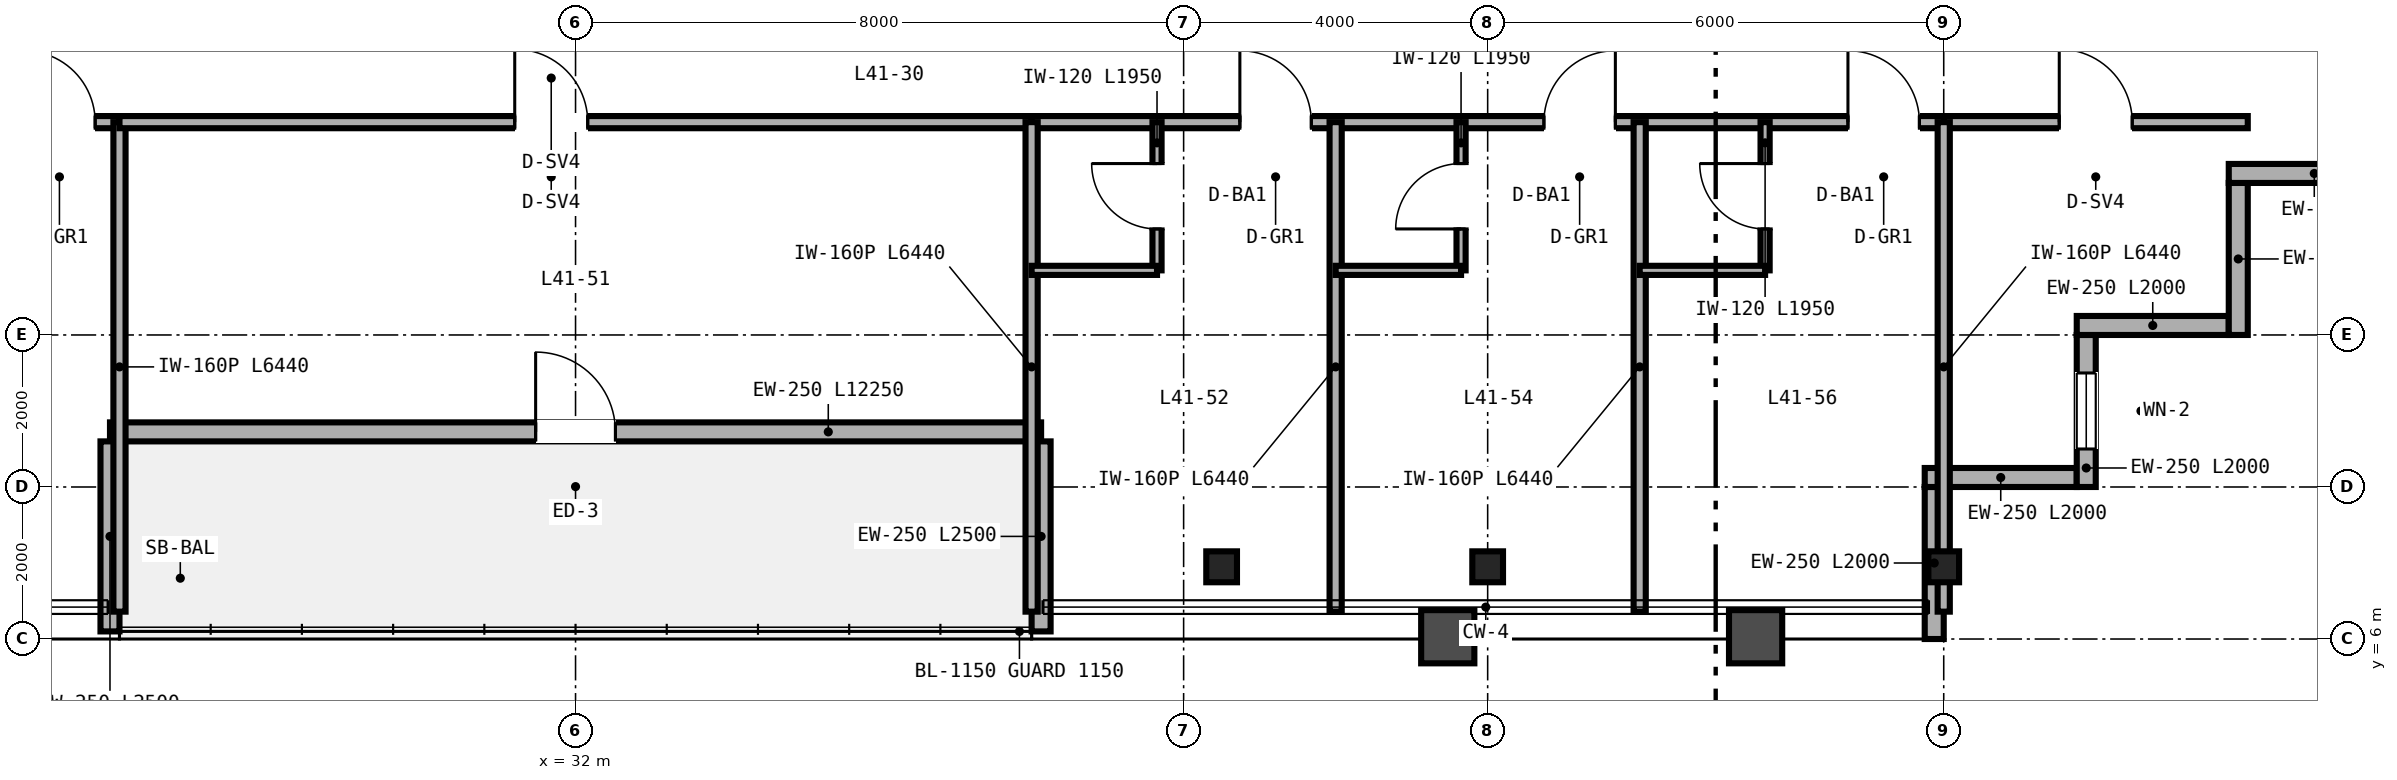
"""IFC4 building model, lengths in metres.
Left out: names, types, materials, properties, quantities, classifications, styles, units other than length and angle.
Written with IfcOpenShell. Run it as: python <this file> out.ifc"""

import sys

from ifc_helpers import new_model, si_unit, direction, frame, frame_2d, origin, origin_2d, place, context, subcontext, project, spatial, rectangle, i_section, extrude, source, transform, mapped, element, fill, save


model = new_model("IFC4")
c1 = context("Model", 3, precision=1e-05, world=origin(), true_north=direction((0.0, 1.0)))
c2 = subcontext(c1, "Body", "Model", "MODEL_VIEW")
j1 = project(units=[si_unit("LENGTHUNIT", "METRE"), si_unit("PLANEANGLEUNIT", "RADIAN")], contexts=[c1])
p1 = place(None, origin())
s1 = spatial("IfcSite", under=j1, at=p1, CompositionType="ELEMENT")
p2 = place(p1, origin())
s2 = spatial("IfcBuilding", under=s1, at=p2, CompositionType="ELEMENT")
p3 = place(p2, frame((0.0, 0.0, 166.8)))
s3 = spatial("IfcBuildingStorey", under=s2, at=p3, CompositionType="ELEMENT", Elevation=166.8)
m1 = source(origin(), c2, "Body", "SweptSolid", [
    extrude(i_section(OverallWidth=0.404, OverallDepth=0.407, WebThickness=0.027, FlangeThickness=0.044, FilletRadius=0.025, at=origin_2d()), origin(), (0.0, 0.0, 1.0), 3.37),
])
for number, where, z_axis, x_axis in (
    (1, (40.5, 6.95, 0.0), (0.0, 0.0, 1.0), (1.0, 0.0, 0.0)),
    (2, (44.0, 6.95, 0.0), (0.0, 0.0, 1.0), (1.0, 0.0, 0.0)),
    (3, (50.0, 6.95, 0.0), (0.0, 0.0, 1.0), (1.0, 0.0, 0.0)),
):
    element("IfcColumn", number, at=place(p3, frame(where, z_axis=z_axis, x_axis=x_axis)), inside=s3, PredefinedType="COLUMN", context=c2, shape_type="MappedRepresentation", body=[
        mapped(m1, transform((0.0, 0.0, 0.0), scale=1.0)),
    ])
p4 = place(p3, frame((49.875, 6.0, 0.0), z_axis=(0.0, 0.0, 1.0), x_axis=(0.0, 1.0, 0.0)))
e4 = element("IfcWall", 4, at=p4, inside=s3, PredefinedType="SOLIDWALL", context=c2, shape_type="SweptSolid", body=[
    extrude(rectangle(XDim=2.0, YDim=0.25, at=frame_2d((1.0, 0.0))), origin(), (0.0, 0.0, 1.0), 2.677),
])
p5 = place(p3, frame((49.75, 8.125, 0.0), z_axis=(0.0, 0.0, 1.0), x_axis=(1.0, 0.0, 0.0)))
e5 = element("IfcWall", 5, at=p5, inside=s3, PredefinedType="SOLIDWALL", context=c2, shape_type="SweptSolid", body=[
    extrude(rectangle(XDim=2.0, YDim=0.25, at=frame_2d((1.0, 0.0))), origin(), (0.0, 0.0, 1.0), 3.37),
])
p6 = place(p3, frame((51.875, 8.0, 0.0), z_axis=(0.0, 0.0, 1.0), x_axis=(0.0, 1.0, 0.0)))
e6 = element("IfcWall", 6, at=p6, inside=s3, PredefinedType="SOLIDWALL", context=c2, shape_type="SweptSolid", body=[
    extrude(rectangle(XDim=2.0, YDim=0.25, at=frame_2d((1.0, 0.0))), origin(), (0.0, 0.0, 1.0), 3.37),
])
p7 = place(p6, frame((0.5, 0.0, 0.85)))
e7 = element("IfcOpeningElement", 7, at=p7, cuts=e6, PredefinedType="OPENING", context=c2, shape_type="SweptSolid", body=[
    extrude(rectangle(XDim=1.0, YDim=1.9, at=frame_2d((0.5, 0.95))), frame((0.0, 0.135, 0.0), z_axis=(0.0, -1.0, 0.0), x_axis=(1.0, 0.0, 0.0)), (0.0, 0.0, 1.0), 0.27),
])
for number, where, z_axis, x_axis in (
    (8, (51.75, 10.125, 0.0), (0.0, 0.0, 1.0), (1.0, 0.0, 0.0)),
    (9, (53.875, 10.0, 0.0), (0.0, 0.0, 1.0), (0.0, 1.0, 0.0)),
):
    element("IfcWall", number, at=place(p3, frame(where, z_axis=z_axis, x_axis=x_axis)), inside=s3, PredefinedType="SOLIDWALL", context=c2, shape_type="SweptSolid", body=[
        extrude(rectangle(XDim=2.0, YDim=0.25, at=frame_2d((1.0, 0.0))), origin(), (0.0, 0.0, 1.0), 3.37),
    ])
p8 = place(p3, frame((53.75, 12.125, 0.0), z_axis=(0.0, 0.0, 1.0), x_axis=(1.0, 0.0, 0.0)))
e10 = element("IfcWall", 10, at=p8, inside=s3, PredefinedType="SOLIDWALL", context=c2, shape_type="SweptSolid", body=[
    extrude(rectangle(XDim=2.25, YDim=0.25, at=frame_2d((1.125, 0.0))), origin(), (0.0, 0.0, 1.0), 3.37),
])
p9 = place(p3, frame((25.875, 8.725, 0.0), z_axis=(0.0, 0.0, 1.0), x_axis=(1.0, 0.0, 0.0)))
e11 = element("IfcWall", 11, at=p9, inside=s3, PredefinedType="SOLIDWALL", context=c2, shape_type="SweptSolid", body=[
    extrude(rectangle(XDim=12.25, YDim=0.25, at=frame_2d((6.125, 0.0))), origin(), (0.0, 0.0, 1.0), 3.37),
])
p10 = place(p9, frame((5.6, 0.0, 0.0)))
e12 = element("IfcOpeningElement", 12, at=p10, cuts=e11, PredefinedType="OPENING", context=c2, shape_type="SweptSolid", body=[
    extrude(rectangle(XDim=1.05, YDim=2.15, at=frame_2d((0.525, 1.075))), frame((0.0, 0.135, 0.0), z_axis=(0.0, -1.0, 0.0), x_axis=(1.0, 0.0, 0.0)), (0.0, 0.0, 1.0), 0.27),
])
for number, where, z_axis, x_axis in (
    (13, (25.875, 6.1, 0.0), (0.0, 0.0, 1.0), (0.0, 1.0, 0.0)),
    (14, (38.125, 6.1, 0.0), (0.0, 0.0, 1.0), (0.0, 1.0, 0.0)),
):
    element("IfcWall", number, at=place(p3, frame(where, z_axis=z_axis, x_axis=x_axis)), inside=s3, PredefinedType="SOLIDWALL", context=c2, shape_type="SweptSolid", body=[
        extrude(rectangle(XDim=2.5, YDim=0.25, at=frame_2d((1.25, 0.0))), origin(), (0.0, 0.0, 1.0), 2.443),
    ])
p11 = place(p3, frame((50.0, 12.8, 0.0), z_axis=(0.0, 0.0, 1.0), x_axis=(1.0, 0.0, 0.0)))
e15 = element("IfcWall", 15, at=p11, inside=s3, PredefinedType="PARTITIONING", context=c2, shape_type="SweptSolid", body=[
    extrude(rectangle(XDim=4.0, YDim=0.16, at=frame_2d((2.0, 0.0))), origin(), (0.0, 0.0, 1.0), 3.37),
])
p12 = place(p11, frame((1.52, 0.0, 0.0)))
e16 = element("IfcOpeningElement", 16, at=p12, cuts=e15, PredefinedType="OPENING", context=c2, shape_type="SweptSolid", body=[
    extrude(rectangle(XDim=0.96, YDim=2.15, at=frame_2d((0.48, 1.075))), frame((0.0, 0.09, 0.0), z_axis=(0.0, -1.0, 0.0), x_axis=(1.0, 0.0, 0.0)), (0.0, 0.0, 1.0), 0.18),
])
p13 = place(p3, frame((14.0, 12.8, 0.0), z_axis=(0.0, 0.0, 1.0), x_axis=(1.0, 0.0, 0.0)))
e17 = element("IfcWall", 17, at=p13, inside=s3, PredefinedType="PARTITIONING", context=c2, shape_type="SweptSolid", body=[
    extrude(rectangle(XDim=12.0, YDim=0.16, at=frame_2d((6.0, 0.0))), origin(), (0.0, 0.0, 1.0), 2.913),
])
p14 = place(p13, frame((2.74, 0.0, 0.0)))
e18 = element("IfcOpeningElement", 18, at=p14, cuts=e17, PredefinedType="OPENING", context=c2, shape_type="SweptSolid", body=[
    extrude(rectangle(XDim=0.94, YDim=2.15, at=frame_2d((0.47, 1.075))), frame((0.0, 0.09, 0.0), z_axis=(0.0, -1.0, 0.0), x_axis=(1.0, 0.0, 0.0)), (0.0, 0.0, 1.0), 0.18),
])
p15 = place(p13, frame((6.74, 0.0, 0.0)))
e19 = element("IfcOpeningElement", 19, at=p15, cuts=e17, PredefinedType="OPENING", context=c2, shape_type="SweptSolid", body=[
    extrude(rectangle(XDim=0.94, YDim=2.15, at=frame_2d((0.47, 1.075))), frame((0.0, 0.09, 0.0), z_axis=(0.0, -1.0, 0.0), x_axis=(1.0, 0.0, 0.0)), (0.0, 0.0, 1.0), 0.18),
])
p16 = place(p13, frame((10.74, 0.0, 0.0)))
e20 = element("IfcOpeningElement", 20, at=p16, cuts=e17, PredefinedType="OPENING", context=c2, shape_type="SweptSolid", body=[
    extrude(rectangle(XDim=0.94, YDim=2.15, at=frame_2d((0.47, 1.075))), frame((0.0, 0.09, 0.0), z_axis=(0.0, -1.0, 0.0), x_axis=(1.0, 0.0, 0.0)), (0.0, 0.0, 1.0), 0.18),
])
p17 = place(p3, frame((26.0, 6.36, 0.0), z_axis=(0.0, 0.0, 1.0), x_axis=(0.0, 1.0, 0.0)))
e21 = element("IfcWall", 21, at=p17, inside=s3, PredefinedType="PARTITIONING", context=c2, shape_type="SweptSolid", body=[
    extrude(rectangle(XDim=6.44, YDim=0.16, at=frame_2d((3.22, 0.0))), origin(), (0.0, 0.0, 1.0), 2.443),
])
p18 = place(p3, frame((26.0, 12.8, 0.0), z_axis=(0.0, 0.0, 1.0), x_axis=(1.0, 0.0, 0.0)))
e22 = element("IfcWall", 22, at=p18, inside=s3, PredefinedType="PARTITIONING", context=c2, shape_type="SweptSolid", body=[
    extrude(rectangle(XDim=12.0, YDim=0.16, at=frame_2d((6.0, 0.0))), origin(), (0.0, 0.0, 1.0), 3.37),
])
p19 = place(p18, frame((5.2, 0.0, 0.0)))
e23 = element("IfcOpeningElement", 23, at=p19, cuts=e22, PredefinedType="OPENING", context=c2, shape_type="SweptSolid", body=[
    extrude(rectangle(XDim=0.96, YDim=2.15, at=frame_2d((0.48, 1.075))), frame((0.0, 0.09, 0.0), z_axis=(0.0, -1.0, 0.0), x_axis=(1.0, 0.0, 0.0)), (0.0, 0.0, 1.0), 0.18),
])
p20 = place(p3, frame((38.0, 12.8, 0.0), z_axis=(0.0, 0.0, 1.0), x_axis=(1.0, 0.0, 0.0)))
e24 = element("IfcWall", 24, at=p20, inside=s3, PredefinedType="PARTITIONING", context=c2, shape_type="SweptSolid", body=[
    extrude(rectangle(XDim=12.0, YDim=0.16, at=frame_2d((6.0, 0.0))), origin(), (0.0, 0.0, 1.0), 2.913),
])
p21 = place(p20, frame((2.74, 0.0, 0.0)))
e25 = element("IfcOpeningElement", 25, at=p21, cuts=e24, PredefinedType="OPENING", context=c2, shape_type="SweptSolid", body=[
    extrude(rectangle(XDim=0.94, YDim=2.15, at=frame_2d((0.47, 1.075))), frame((0.0, 0.09, 0.0), z_axis=(0.0, -1.0, 0.0), x_axis=(1.0, 0.0, 0.0)), (0.0, 0.0, 1.0), 0.18),
])
p22 = place(p20, frame((6.74, 0.0, 0.0)))
e26 = element("IfcOpeningElement", 26, at=p22, cuts=e24, PredefinedType="OPENING", context=c2, shape_type="SweptSolid", body=[
    extrude(rectangle(XDim=0.94, YDim=2.15, at=frame_2d((0.47, 1.075))), frame((0.0, 0.09, 0.0), z_axis=(0.0, -1.0, 0.0), x_axis=(1.0, 0.0, 0.0)), (0.0, 0.0, 1.0), 0.18),
])
p23 = place(p20, frame((10.74, 0.0, 0.0)))
e27 = element("IfcOpeningElement", 27, at=p23, cuts=e24, PredefinedType="OPENING", context=c2, shape_type="SweptSolid", body=[
    extrude(rectangle(XDim=0.94, YDim=2.15, at=frame_2d((0.47, 1.075))), frame((0.0, 0.09, 0.0), z_axis=(0.0, -1.0, 0.0), x_axis=(1.0, 0.0, 0.0)), (0.0, 0.0, 1.0), 0.18),
])
p24 = place(p3, frame((38.0, 6.36, 0.0), z_axis=(0.0, 0.0, 1.0), x_axis=(0.0, 1.0, 0.0)))
e28 = element("IfcWall", 28, at=p24, inside=s3, PredefinedType="PARTITIONING", context=c2, shape_type="SweptSolid", body=[
    extrude(rectangle(XDim=6.44, YDim=0.16, at=frame_2d((3.22, 0.0))), origin(), (0.0, 0.0, 1.0), 2.443),
])
p25 = place(p3, frame((50.0, 6.36, 0.0), z_axis=(0.0, 0.0, 1.0), x_axis=(0.0, 1.0, 0.0)))
e29 = element("IfcWall", 29, at=p25, inside=s3, PredefinedType="PARTITIONING", context=c2, shape_type="SweptSolid", body=[
    extrude(rectangle(XDim=6.44, YDim=0.16, at=frame_2d((3.22, 0.0))), origin(), (0.0, 0.0, 1.0), 2.677),
])
p26 = place(p3, frame((42.0, 6.36, 0.0), z_axis=(0.0, 0.0, 1.0), x_axis=(0.0, 1.0, 0.0)))
e30 = element("IfcWall", 30, at=p26, inside=s3, PredefinedType="PARTITIONING", context=c2, shape_type="SweptSolid", body=[
    extrude(rectangle(XDim=6.44, YDim=0.16, at=frame_2d((3.22, 0.0))), origin(), (0.0, 0.0, 1.0), 2.833),
])
p27 = place(p3, frame((39.65, 10.85, 0.0), z_axis=(0.0, 0.0, 1.0), x_axis=(0.0, 1.0, 0.0)))
e31 = element("IfcWall", 31, at=p27, inside=s3, PredefinedType="PARTITIONING", context=c2, shape_type="SweptSolid", body=[
    extrude(rectangle(XDim=1.95, YDim=0.12, at=frame_2d((0.975, 0.0))), origin(), (0.0, 0.0, 1.0), 3.37),
])
p28 = place(p27, frame((0.545, 0.0, 0.0)))
e32 = element("IfcOpeningElement", 32, at=p28, cuts=e31, PredefinedType="OPENING", context=c2, shape_type="SweptSolid", body=[
    extrude(rectangle(XDim=0.86, YDim=2.1, at=frame_2d((0.43, 1.05))), frame((0.0, 0.07, 0.0), z_axis=(0.0, -1.0, 0.0), x_axis=(1.0, 0.0, 0.0)), (0.0, 0.0, 1.0), 0.14),
])
p29 = place(p3, frame((38.0, 10.85, 0.0), z_axis=(0.0, 0.0, 1.0), x_axis=(1.0, 0.0, 0.0)))
e33 = element("IfcWall", 33, at=p29, inside=s3, PredefinedType="PARTITIONING", context=c2, shape_type="SweptSolid", body=[
    extrude(rectangle(XDim=1.65, YDim=0.12, at=frame_2d((0.825, 0.0))), origin(), (0.0, 0.0, 1.0), 3.37),
])
p30 = place(p3, frame((46.0, 6.36, 0.0), z_axis=(0.0, 0.0, 1.0), x_axis=(0.0, 1.0, 0.0)))
e34 = element("IfcWall", 34, at=p30, inside=s3, PredefinedType="PARTITIONING", context=c2, shape_type="SweptSolid", body=[
    extrude(rectangle(XDim=6.44, YDim=0.16, at=frame_2d((3.22, 0.0))), origin(), (0.0, 0.0, 1.0), 2.677),
])
p31 = place(p3, frame((43.65, 10.85, 0.0), z_axis=(0.0, 0.0, 1.0), x_axis=(0.0, 1.0, 0.0)))
e35 = element("IfcWall", 35, at=p31, inside=s3, PredefinedType="PARTITIONING", context=c2, shape_type="SweptSolid", body=[
    extrude(rectangle(XDim=1.95, YDim=0.12, at=frame_2d((0.975, 0.0))), origin(), (0.0, 0.0, 1.0), 3.37),
])
p32 = place(p31, frame((0.545, 0.0, 0.0)))
e36 = element("IfcOpeningElement", 36, at=p32, cuts=e35, PredefinedType="OPENING", context=c2, shape_type="SweptSolid", body=[
    extrude(rectangle(XDim=0.86, YDim=2.1, at=frame_2d((0.43, 1.05))), frame((0.0, 0.07, 0.0), z_axis=(0.0, -1.0, 0.0), x_axis=(1.0, 0.0, 0.0)), (0.0, 0.0, 1.0), 0.14),
])
p33 = place(p3, frame((42.0, 10.85, 0.0), z_axis=(0.0, 0.0, 1.0), x_axis=(1.0, 0.0, 0.0)))
e37 = element("IfcWall", 37, at=p33, inside=s3, PredefinedType="PARTITIONING", context=c2, shape_type="SweptSolid", body=[
    extrude(rectangle(XDim=1.65, YDim=0.12, at=frame_2d((0.825, 0.0))), origin(), (0.0, 0.0, 1.0), 3.37),
])
p34 = place(p3, frame((47.65, 10.85, 0.0), z_axis=(0.0, 0.0, 1.0), x_axis=(0.0, 1.0, 0.0)))
e38 = element("IfcWall", 38, at=p34, inside=s3, PredefinedType="PARTITIONING", context=c2, shape_type="SweptSolid", body=[
    extrude(rectangle(XDim=1.95, YDim=0.12, at=frame_2d((0.975, 0.0))), origin(), (0.0, 0.0, 1.0), 3.37),
])
p35 = place(p34, frame((0.545, 0.0, 0.0)))
e39 = element("IfcOpeningElement", 39, at=p35, cuts=e38, PredefinedType="OPENING", context=c2, shape_type="SweptSolid", body=[
    extrude(rectangle(XDim=0.86, YDim=2.1, at=frame_2d((0.43, 1.05))), frame((0.0, 0.07, 0.0), z_axis=(0.0, -1.0, 0.0), x_axis=(1.0, 0.0, 0.0)), (0.0, 0.0, 1.0), 0.14),
])
p36 = place(p3, frame((46.0, 10.85, 0.0), z_axis=(0.0, 0.0, 1.0), x_axis=(1.0, 0.0, 0.0)))
e40 = element("IfcWall", 40, at=p36, inside=s3, PredefinedType="PARTITIONING", context=c2, shape_type="SweptSolid", body=[
    extrude(rectangle(XDim=1.65, YDim=0.12, at=frame_2d((0.825, 0.0))), origin(), (0.0, 0.0, 1.0), 3.37),
])
m2 = source(origin(), c2, "Body", "SweptSolid", [
    extrude(rectangle(XDim=1.0, YDim=1.9, at=frame_2d((0.5, 0.95))), frame((0.0, 0.03, 0.0), z_axis=(0.0, -1.0, 0.0), x_axis=(1.0, 0.0, 0.0)), (0.0, 0.0, 1.0), 0.06),
])
p37 = place(p7, origin())
e41 = element("IfcWindow", 41, at=p37, inside=s3, PartitioningType="SINGLE_PANEL", PredefinedType="WINDOW", context=c2, shape_type="MappedRepresentation", body=[
    mapped(m2, transform((0.0, 0.0, 0.0), scale=1.0)),
])
fill(e7, e41)
m3 = source(origin(), c2, "Body", "SweptSolid", [
    extrude(rectangle(XDim=1.05, YDim=2.15, at=frame_2d((0.525, 1.075))), frame((0.0, 0.025, 0.0), z_axis=(0.0, -1.0, 0.0), x_axis=(1.0, 0.0, 0.0)), (0.0, 0.0, 1.0), 0.05),
])
p38 = place(p10, origin())
e42 = element("IfcDoor", 42, at=p38, inside=s3, OperationType="SINGLE_SWING_LEFT", PredefinedType="DOOR", context=c2, shape_type="MappedRepresentation", body=[
    mapped(m3, transform((0.0, 0.0, 0.0), scale=1.0)),
])
fill(e12, e42)
m4 = source(origin(), c2, "Body", "SweptSolid", [
    extrude(rectangle(XDim=0.96, YDim=2.15, at=frame_2d((0.48, 1.075))), frame((0.0, 0.025, 0.0), z_axis=(0.0, -1.0, 0.0), x_axis=(1.0, 0.0, 0.0)), (0.0, 0.0, 1.0), 0.05),
])
p39 = place(p12, origin())
e43 = element("IfcDoor", 43, at=p39, inside=s3, OperationType="SINGLE_SWING_LEFT", PredefinedType="DOOR", context=c2, shape_type="MappedRepresentation", body=[
    mapped(m4, transform((0.0, 0.0, 0.0), scale=1.0)),
])
fill(e16, e43)
m5 = source(origin(), c2, "Body", "SweptSolid", [
    extrude(rectangle(XDim=0.94, YDim=2.15, at=frame_2d((0.47, 1.075))), frame((0.0, 0.025, 0.0), z_axis=(0.0, -1.0, 0.0), x_axis=(1.0, 0.0, 0.0)), (0.0, 0.0, 1.0), 0.05),
])
p40 = place(p16, origin())
e44 = element("IfcDoor", 44, at=p40, inside=s3, OperationType="SINGLE_SWING_LEFT", PredefinedType="DOOR", context=c2, shape_type="MappedRepresentation", body=[
    mapped(m5, transform((0.0, 0.0, 0.0), scale=1.0)),
])
fill(e20, e44)
p41 = place(p19, origin())
e45 = element("IfcDoor", 45, at=p41, inside=s3, OperationType="SINGLE_SWING_LEFT", PredefinedType="DOOR", context=c2, shape_type="MappedRepresentation", body=[
    mapped(m4, transform((0.0, 0.0, 0.0), scale=1.0)),
])
fill(e23, e45)
m6 = source(origin(), c2, "Body", "SweptSolid", [
    extrude(rectangle(XDim=0.86, YDim=2.1, at=frame_2d((0.43, 1.05))), frame((0.0, 0.025, 0.0), z_axis=(0.0, -1.0, 0.0), x_axis=(1.0, 0.0, 0.0)), (0.0, 0.0, 1.0), 0.05),
])
p42 = place(p28, origin())
e46 = element("IfcDoor", 46, at=p42, inside=s3, OperationType="SINGLE_SWING_RIGHT", PredefinedType="DOOR", context=c2, shape_type="MappedRepresentation", body=[
    mapped(m6, transform((0.0, 0.0, 0.0), scale=1.0)),
])
fill(e32, e46)
p43 = place(p32, origin())
e47 = element("IfcDoor", 47, at=p43, inside=s3, OperationType="SINGLE_SWING_LEFT", PredefinedType="DOOR", context=c2, shape_type="MappedRepresentation", body=[
    mapped(m6, transform((0.0, 0.0, 0.0), scale=1.0)),
])
fill(e36, e47)
p44 = place(p35, origin())
e48 = element("IfcDoor", 48, at=p44, inside=s3, OperationType="SINGLE_SWING_RIGHT", PredefinedType="DOOR", context=c2, shape_type="MappedRepresentation", body=[
    mapped(m6, transform((0.0, 0.0, 0.0), scale=1.0)),
])
fill(e39, e48)
p45 = place(p21, origin())
e49 = element("IfcDoor", 49, at=p45, inside=s3, OperationType="SINGLE_SWING_LEFT", PredefinedType="DOOR", context=c2, shape_type="MappedRepresentation", body=[
    mapped(m5, transform((0.0, 0.0, 0.0), scale=1.0)),
])
fill(e25, e49)
p46 = place(p22, origin())
e50 = element("IfcDoor", 50, at=p46, inside=s3, OperationType="SINGLE_SWING_RIGHT", PredefinedType="DOOR", context=c2, shape_type="MappedRepresentation", body=[
    mapped(m5, transform((0.0, 0.0, 0.0), scale=1.0)),
])
fill(e26, e50)
p47 = place(p23, origin())
e51 = element("IfcDoor", 51, at=p47, inside=s3, OperationType="SINGLE_SWING_LEFT", PredefinedType="DOOR", context=c2, shape_type="MappedRepresentation", body=[
    mapped(m5, transform((0.0, 0.0, 0.0), scale=1.0)),
])
fill(e27, e51)
save(model, sys.argv[1])
